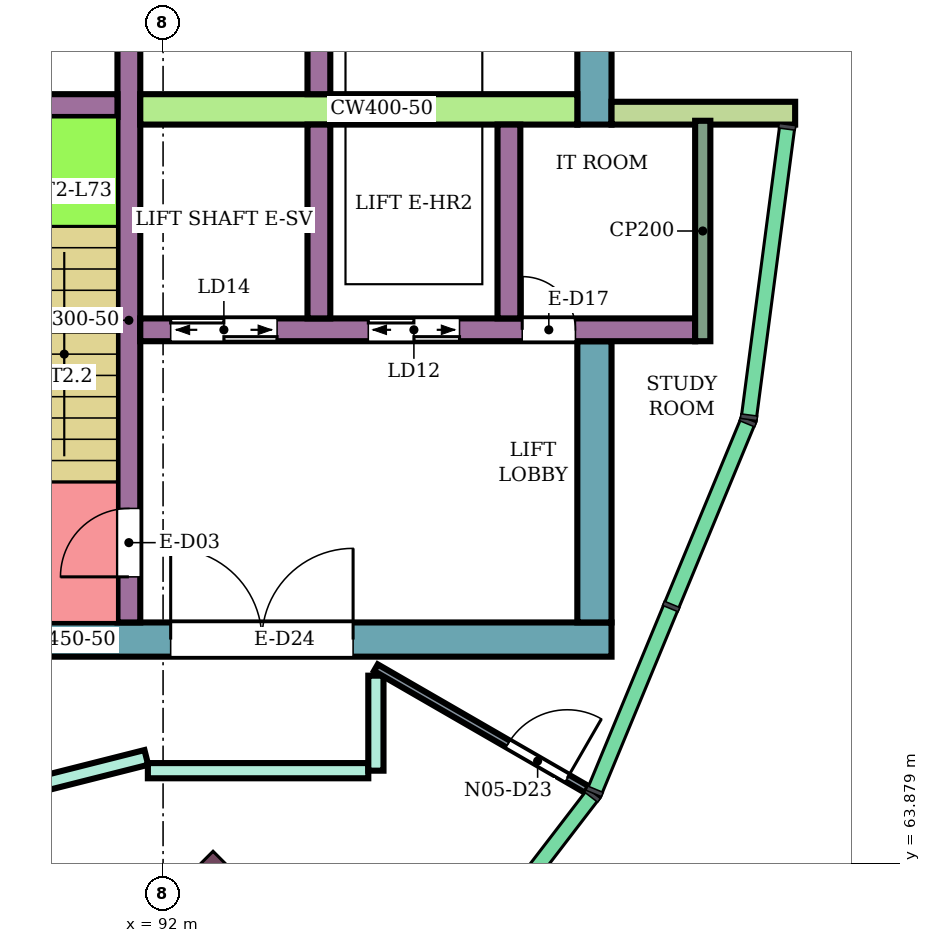
"""IFC4 building model, lengths in metres.
Left out: names, types, materials, properties, quantities, classifications, styles, units other than length and angle.
Written with IfcOpenShell. Run it as: python <this file> out.ifc"""

import sys

from ifc_helpers import new_model, si_unit, direction, frame, frame_2d, origin, origin_2d, place, context, subcontext, project, spatial, rectangle, extrude, element, fill, save


model = new_model("IFC4")
c1 = context("Model", 3, precision=1e-05, world=origin(), true_north=direction((0.0, 1.0)))
c2 = subcontext(c1, "Body", "Model", "MODEL_VIEW")
j1 = project(units=[si_unit("LENGTHUNIT", "METRE"), si_unit("PLANEANGLEUNIT", "RADIAN")], contexts=[c1])
p1 = place(None, origin())
s1 = spatial("IfcSite", under=j1, at=p1, CompositionType="ELEMENT")
p2 = place(p1, origin())
s2 = spatial("IfcBuilding", under=s1, at=p2, CompositionType="ELEMENT")
p3 = place(p2, frame((0.0, 0.0, 319.3)))
s3 = spatial("IfcBuildingStorey", under=s2, at=p3, CompositionType="ELEMENT", Elevation=319.3)
p4 = place(p3, frame((92.233, 62.767, 0.0), z_axis=(0.0, 0.0, 1.0), x_axis=(0.707106781187, -0.707106781187, 0.0)))
e1 = element("IfcColumn", 1, at=p4, inside=s3, PredefinedType="COLUMN", context=c2, shape_type="SweptSolid", body=[
    extrude(rectangle(XDim=1.2, YDim=2.4, at=origin_2d()), origin(), (0.0, 0.0, 1.0), 4.4),
])
p5 = place(p3, frame((87.9, 66.825, 0.0), z_axis=(0.0, 0.0, 1.0), x_axis=(1.0, 0.0, 0.0)))
e2 = element("IfcWall", 2, at=p5, inside=s3, PredefinedType="SHEAR", context=c2, shape_type="SweptSolid", body=[
    extrude(rectangle(XDim=10.0, YDim=0.45, at=frame_2d((5.0, 0.0))), origin(), (0.0, 0.0, 1.0), 4.08),
])
p6 = place(p5, frame((4.2, 0.0, 0.0)))
e3 = element("IfcOpeningElement", 3, at=p6, cuts=e2, PredefinedType="OPENING", context=c2, shape_type="SweptSolid", body=[
    extrude(rectangle(XDim=2.4, YDim=2.4, at=frame_2d((1.2, 1.2))), frame((0.0, 0.235, 0.0), z_axis=(0.0, -1.0, 0.0), x_axis=(1.0, 0.0, 0.0)), (0.0, 0.0, 1.0), 0.47),
])
p7 = place(p3, frame((97.675, 73.6, 0.0), z_axis=(0.0, 0.0, 1.0), x_axis=(0.0, 1.0, 0.0)))
e4 = element("IfcWall", 4, at=p7, inside=s3, PredefinedType="SHEAR", context=c2, shape_type="SweptSolid", body=[
    extrude(rectangle(XDim=9.35, YDim=0.45, at=frame_2d((4.675, 0.0))), origin(), (0.0, 0.0, 1.0), 4.08),
])
p8 = place(p3, frame((97.675, 67.05, 0.0), z_axis=(0.0, 0.0, 1.0), x_axis=(0.0, 1.0, 0.0)))
e5 = element("IfcWall", 5, at=p8, inside=s3, PredefinedType="SHEAR", context=c2, shape_type="SweptSolid", body=[
    extrude(rectangle(XDim=3.7, YDim=0.45, at=frame_2d((1.85, 0.0))), origin(), (0.0, 0.0, 1.0), 4.08),
])
p9 = place(p3, frame((91.55, 67.05, 0.0), z_axis=(0.0, 0.0, 1.0), x_axis=(0.0, 1.0, 0.0)))
e6 = element("IfcWall", 6, at=p9, inside=s3, PredefinedType="SHEAR", context=c2, shape_type="SweptSolid", body=[
    extrude(rectangle(XDim=7.95, YDim=0.3, at=frame_2d((3.975, 0.0))), origin(), (0.0, 0.0, 1.0), 4.08),
])
p10 = place(p9, frame((0.6, 0.0, 0.0)))
e7 = element("IfcOpeningElement", 7, at=p10, cuts=e6, PredefinedType="OPENING", context=c2, shape_type="SweptSolid", body=[
    extrude(rectangle(XDim=0.9, YDim=2.1, at=frame_2d((0.45, 1.05))), frame((0.0, 0.16, 0.0), z_axis=(0.0, -1.0, 0.0), x_axis=(1.0, 0.0, 0.0)), (0.0, 0.0, 1.0), 0.32),
])
p11 = place(p3, frame((88.35, 73.85, 0.0), z_axis=(0.0, 0.0, 1.0), x_axis=(1.0, 0.0, 0.0)))
e8 = element("IfcWall", 8, at=p11, inside=s3, PredefinedType="SHEAR", context=c2, shape_type="SweptSolid", body=[
    extrude(rectangle(XDim=3.05, YDim=0.3, at=frame_2d((1.525, 0.0))), origin(), (0.0, 0.0, 1.0), 4.08),
])
p12 = place(p3, frame((91.7, 73.8, 0.0), z_axis=(0.0, 0.0, 1.0), x_axis=(1.0, 0.0, 0.0)))
e9 = element("IfcWall", 9, at=p12, inside=s3, PredefinedType="SHEAR", context=c2, shape_type="SweptSolid", body=[
    extrude(rectangle(XDim=5.75, YDim=0.4, at=frame_2d((2.875, 0.0))), origin(), (0.0, 0.0, 1.0), 4.08),
])
p13 = place(p3, frame((91.7, 70.9, 0.0), z_axis=(0.0, 0.0, 1.0), x_axis=(1.0, 0.0, 0.0)))
e10 = element("IfcWall", 10, at=p13, inside=s3, PredefinedType="SHEAR", context=c2, shape_type="SweptSolid", body=[
    extrude(rectangle(XDim=7.3, YDim=0.3, at=frame_2d((3.65, 0.0))), origin(), (0.0, 0.0, 1.0), 4.08),
])
p14 = place(p13, frame((0.4, 0.0, 0.0)))
e11 = element("IfcOpeningElement", 11, at=p14, cuts=e10, PredefinedType="OPENING", context=c2, shape_type="SweptSolid", body=[
    extrude(rectangle(XDim=1.4, YDim=2.1, at=frame_2d((0.7, 1.05))), frame((0.0, 0.16, 0.0), z_axis=(0.0, -1.0, 0.0), x_axis=(1.0, 0.0, 0.0)), (0.0, 0.0, 1.0), 0.32),
])
p15 = place(p13, frame((3.0, 0.0, 0.0)))
e12 = element("IfcOpeningElement", 12, at=p15, cuts=e10, PredefinedType="OPENING", context=c2, shape_type="SweptSolid", body=[
    extrude(rectangle(XDim=1.2, YDim=2.1, at=frame_2d((0.6, 1.05))), frame((0.0, 0.16, 0.0), z_axis=(0.0, -1.0, 0.0), x_axis=(1.0, 0.0, 0.0)), (0.0, 0.0, 1.0), 0.32),
])
p16 = place(p13, frame((5.025, 0.0, 0.0)))
e13 = element("IfcOpeningElement", 13, at=p16, cuts=e10, PredefinedType="OPENING", context=c2, shape_type="SweptSolid", body=[
    extrude(rectangle(XDim=0.7, YDim=2.1, at=frame_2d((0.35, 1.05))), frame((0.0, 0.16, 0.0), z_axis=(0.0, -1.0, 0.0), x_axis=(1.0, 0.0, 0.0)), (0.0, 0.0, 1.0), 0.32),
])
for number, where, z_axis, x_axis in (
    (14, (94.05, 74.0, 0.0), (0.0, 0.0, 1.0), (0.0, 1.0, 0.0)),
    (15, (94.05, 71.05, 0.0), (0.0, 0.0, 1.0), (0.0, 1.0, 0.0)),
    (16, (96.55, 71.05, 0.0), (0.0, 0.0, 1.0), (0.0, 1.0, 0.0)),
):
    element("IfcWall", number, at=place(p3, frame(where, z_axis=z_axis, x_axis=x_axis)), inside=s3, PredefinedType="SHEAR", context=c2, shape_type="SweptSolid", body=[
        extrude(rectangle(XDim=2.55, YDim=0.3, at=frame_2d((1.275, 0.0))), origin(), (0.0, 0.0, 1.0), 4.08),
    ])
p17 = place(p3, frame((97.9, 73.75, 0.0), z_axis=(0.0, 0.0, 1.0), x_axis=(1.0, 0.0, 0.0)))
e17 = element("IfcWall", 17, at=p17, inside=s3, PredefinedType="NOTDEFINED", context=c2, shape_type="SweptSolid", body=[
    extrude(rectangle(XDim=2.416, YDim=0.3, at=frame_2d((1.208, 0.0))), origin(), (0.0, 0.0, 1.0), 4.4),
])
p18 = place(p3, frame((86.053, 63.826, 0.0), z_axis=(0.0, 0.0, 1.0), x_axis=(0.969480070232, 0.245170131586, 0.0)))
e18 = element("IfcWall", 18, at=p18, inside=s3, PredefinedType="PARTITIONING", context=c2, shape_type="SweptSolid", body=[
    extrude(rectangle(XDim=5.907, YDim=0.2, at=frame_2d((2.954, 0.0))), origin(), (0.0, 0.0, 1.0), 3.95),
])
p19 = place(p18, frame((0.889, 0.0, 0.0)))
e19 = element("IfcOpeningElement", 19, at=p19, cuts=e18, PredefinedType="OPENING", context=c2, shape_type="SweptSolid", body=[
    extrude(rectangle(XDim=1.0, YDim=2.1, at=frame_2d((0.5, 1.05))), frame((0.0, 0.11, 0.0), z_axis=(0.0, -1.0, 0.0), x_axis=(1.0, 0.0, 0.0)), (0.0, 0.0, 1.0), 0.22),
])
p20 = place(p3, frame((91.8, 65.1, 0.0), z_axis=(0.0, 0.0, 1.0), x_axis=(1.0, 0.0, 0.0)))
e20 = element("IfcWall", 20, at=p20, inside=s3, PredefinedType="PARTITIONING", context=c2, shape_type="SweptSolid", body=[
    extrude(rectangle(XDim=2.9, YDim=0.2, at=frame_2d((1.45, 0.0))), origin(), (0.0, 0.0, 1.0), 3.95),
])
p21 = place(p3, frame((94.8, 65.1, 0.0), z_axis=(0.0, 0.0, 1.0), x_axis=(0.0, 1.0, 0.0)))
e21 = element("IfcWall", 21, at=p21, inside=s3, PredefinedType="PARTITIONING", context=c2, shape_type="SweptSolid", body=[
    extrude(rectangle(XDim=1.25, YDim=0.2, at=frame_2d((0.625, 0.0))), origin(), (0.0, 0.0, 1.0), 3.95),
])
p22 = place(p3, frame((94.8, 66.455, 0.0), z_axis=(0.0, 0.0, 1.0), x_axis=(0.866056279496, -0.499946517884, 0.0)))
e22 = element("IfcWall", 22, at=p22, inside=s3, PredefinedType="PARTITIONING", context=c2, shape_type="SweptSolid", body=[
    extrude(rectangle(XDim=3.207, YDim=0.1, at=frame_2d((1.604, 0.0))), origin(), (0.0, 0.0, 1.0), 3.95),
])
p23 = place(p22, frame((2.007, 0.0, 0.0)))
e23 = element("IfcOpeningElement", 23, at=p23, cuts=e22, PredefinedType="OPENING", context=c2, shape_type="SweptSolid", body=[
    extrude(rectangle(XDim=0.9, YDim=2.1, at=frame_2d((0.45, 1.05))), frame((0.0, 0.06, 0.0), z_axis=(0.0, -1.0, 0.0), x_axis=(1.0, 0.0, 0.0)), (0.0, 0.0, 1.0), 0.12),
])
p24 = place(p3, frame((99.1, 70.75, 0.0), z_axis=(0.0, 0.0, 1.0), x_axis=(0.0, 1.0, 0.0)))
e24 = element("IfcWall", 24, at=p24, inside=s3, PredefinedType="PARTITIONING", context=c2, shape_type="SweptSolid", body=[
    extrude(rectangle(XDim=2.9, YDim=0.2, at=frame_2d((1.45, 0.0))), origin(), (0.0, 0.0, 1.0), 4.08),
])
p25 = place(p23, origin())
e25 = element("IfcDoor", 25, at=p25, inside=s3, OperationType="SINGLE_SWING_RIGHT", PredefinedType="DOOR", context=c2, shape_type="SweptSolid", body=[
    extrude(rectangle(XDim=0.9, YDim=2.1, at=frame_2d((0.45, 1.05))), frame((0.0, 0.025, 0.0), z_axis=(0.0, -1.0, 0.0), x_axis=(1.0, 0.0, 0.0)), (0.0, 0.0, 1.0), 0.05),
])
fill(e23, e25)
p26 = place(p10, origin())
e26 = element("IfcDoor", 26, at=p26, inside=s3, OperationType="SINGLE_SWING_LEFT", PredefinedType="DOOR", context=c2, shape_type="SweptSolid", body=[
    extrude(rectangle(XDim=0.9, YDim=2.1, at=frame_2d((0.45, 1.05))), frame((0.0, 0.025, 0.0), z_axis=(0.0, -1.0, 0.0), x_axis=(1.0, 0.0, 0.0)), (0.0, 0.0, 1.0), 0.05),
])
fill(e7, e26)
p27 = place(p14, origin())
e27 = element("IfcDoor", 27, at=p27, inside=s3, OperationType="DOUBLE_DOOR_SLIDING", PredefinedType="DOOR", context=c2, shape_type="SweptSolid", body=[
    extrude(rectangle(XDim=1.4, YDim=2.1, at=frame_2d((0.7, 1.05))), frame((0.0, 0.025, 0.0), z_axis=(0.0, -1.0, 0.0), x_axis=(1.0, 0.0, 0.0)), (0.0, 0.0, 1.0), 0.05),
])
fill(e11, e27)
p28 = place(p15, origin())
e28 = element("IfcDoor", 28, at=p28, inside=s3, OperationType="DOUBLE_DOOR_SLIDING", PredefinedType="DOOR", context=c2, shape_type="SweptSolid", body=[
    extrude(rectangle(XDim=1.2, YDim=2.1, at=frame_2d((0.6, 1.05))), frame((0.0, 0.025, 0.0), z_axis=(0.0, -1.0, 0.0), x_axis=(1.0, 0.0, 0.0)), (0.0, 0.0, 1.0), 0.05),
])
fill(e12, e28)
p29 = place(p16, origin())
e29 = element("IfcDoor", 29, at=p29, inside=s3, OperationType="SINGLE_SWING_LEFT", PredefinedType="DOOR", context=c2, shape_type="SweptSolid", body=[
    extrude(rectangle(XDim=0.7, YDim=2.1, at=frame_2d((0.35, 1.05))), frame((0.0, 0.025, 0.0), z_axis=(0.0, -1.0, 0.0), x_axis=(1.0, 0.0, 0.0)), (0.0, 0.0, 1.0), 0.05),
])
fill(e13, e29)
p30 = place(p6, origin())
e30 = element("IfcDoor", 30, at=p30, inside=s3, OperationType="DOUBLE_DOOR_SINGLE_SWING", PredefinedType="DOOR", context=c2, shape_type="SweptSolid", body=[
    extrude(rectangle(XDim=2.4, YDim=2.4, at=frame_2d((1.2, 1.2))), frame((0.0, 0.025, 0.0), z_axis=(0.0, -1.0, 0.0), x_axis=(1.0, 0.0, 0.0)), (0.0, 0.0, 1.0), 0.05),
])
fill(e3, e30)
save(model, sys.argv[1])
